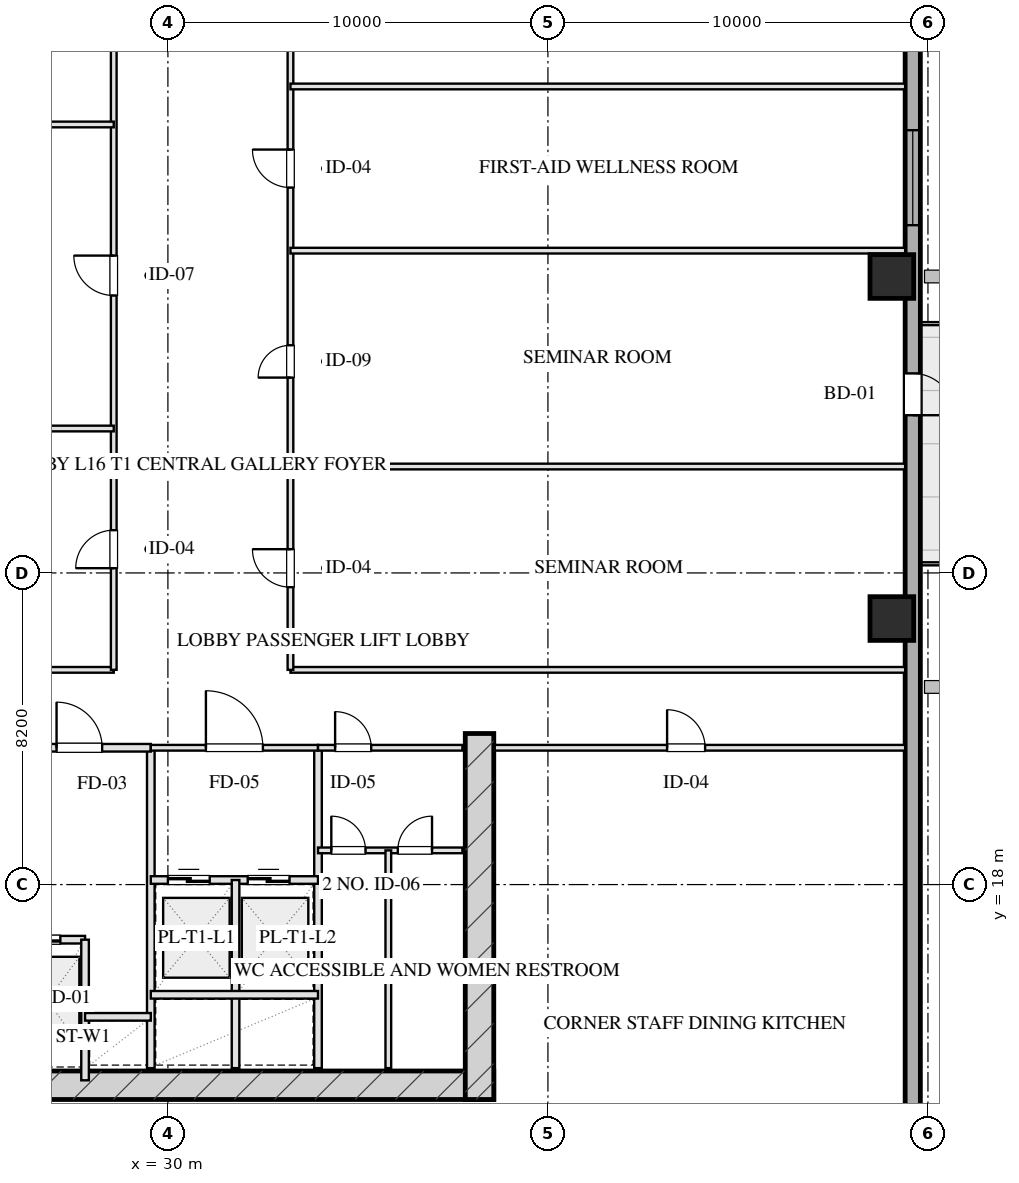
"""IFC4 building model, lengths in metres.
Left out: names, types, materials, properties, quantities, classifications, styles, units other than length and angle.
Written with IfcOpenShell. Run it as: python <this file> out.ifc"""

import sys

from ifc_helpers import new_model, si_unit, direction, frame, frame_2d, origin, origin_2d, place, context, subcontext, project, spatial, rectangle, hollow_rectangle, extrude, element, fill, save


model = new_model("IFC4")
c1 = context("Model", 3, precision=1e-05, world=origin(), true_north=direction((0.0, 1.0)))
c2 = subcontext(c1, "Body", "Model", "MODEL_VIEW")
j1 = project(units=[si_unit("LENGTHUNIT", "METRE"), si_unit("PLANEANGLEUNIT", "RADIAN")], contexts=[c1])
p1 = place(None, origin())
s1 = spatial("IfcSite", under=j1, at=p1, CompositionType="ELEMENT")
p2 = place(p1, origin())
s2 = spatial("IfcBuilding", under=s1, at=p2, CompositionType="ELEMENT")
p3 = place(p2, frame((0.0, 0.0, 67.85)))
s3 = spatial("IfcBuildingStorey", under=s2, at=p3, CompositionType="ELEMENT", Elevation=67.85)
p4 = place(p3, frame((21.425, 12.72, 0.0), z_axis=(0.0, 0.0, 1.0), x_axis=(1.0, 0.0, 0.0)))
e1 = element("IfcWall", 1, at=p4, inside=s3, PredefinedType="SHEAR", context=c2, shape_type="SweptSolid", body=[
    extrude(rectangle(XDim=17.15, YDim=0.75, at=frame_2d((8.575, 0.0))), origin(), (0.0, 0.0, 1.0), 3.45),
])
p5 = place(p3, frame((38.2, 21.975, 0.0), z_axis=(0.0, 0.0, 1.0), x_axis=(0.0, -1.0, 0.0)))
e2 = element("IfcWall", 2, at=p5, inside=s3, PredefinedType="SHEAR", context=c2, shape_type="SweptSolid", body=[
    extrude(rectangle(XDim=9.63, YDim=0.75, at=frame_2d((4.815, 0.0))), origin(), (0.0, 0.0, 1.0), 3.45),
])
for number, where, z_axis, x_axis in (
    (3, (49.05, 25.0, 0.0), (0.0, 0.0, 1.0), (1.0, 0.0, 0.0)),
    (4, (49.05, 34.0, 0.0), (0.0, 0.0, 1.0), (1.0, 0.0, 0.0)),
):
    element("IfcColumn", number, at=place(p3, frame(where, z_axis=z_axis, x_axis=x_axis)), inside=s3, PredefinedType="COLUMN", context=c2, shape_type="SweptSolid", body=[
        extrude(hollow_rectangle(XDim=1.15, YDim=1.15, WallThickness=0.04, at=origin_2d()), origin(), (0.0, 0.0, 1.0), 3.451),
    ])
p6 = place(p3, frame((49.6, 60.8, 0.0), z_axis=(0.0, 0.0, 1.0), x_axis=(0.0, -1.0, 0.0)))
e5 = element("IfcWall", 5, at=p6, inside=s3, PredefinedType="SOLIDWALL", context=c2, shape_type="SweptSolid", body=[
    extrude(rectangle(XDim=53.6, YDim=0.4, at=frame_2d((26.8, 0.0))), origin(), (0.0, 0.0, 1.0), 2.61),
])
p7 = place(p6, frame((22.95, 0.0, 0.75)))
e6 = element("IfcOpeningElement", 6, at=p7, cuts=e5, PredefinedType="OPENING", context=c2, shape_type="SweptSolid", body=[
    extrude(rectangle(XDim=2.5, YDim=1.46, at=frame_2d((1.25, 0.73))), frame((0.0, 0.21, 0.0), z_axis=(0.0, -1.0, 0.0), x_axis=(1.0, 0.0, 0.0)), (0.0, 0.0, 1.0), 0.42),
])
p8 = place(p6, frame((29.35, 0.0, 0.0)))
e7 = element("IfcOpeningElement", 7, at=p8, cuts=e5, PredefinedType="OPENING", context=c2, shape_type="SweptSolid", body=[
    extrude(rectangle(XDim=1.1, YDim=2.15, at=frame_2d((0.55, 1.075))), frame((0.0, 0.21, 0.0), z_axis=(0.0, -1.0, 0.0), x_axis=(1.0, 0.0, 0.0)), (0.0, 0.0, 1.0), 0.42),
])
p9 = place(p3, frame((29.55, 21.6, 0.0), z_axis=(0.0, 0.0, 1.0), x_axis=(0.0, -1.0, 0.0)))
e8 = element("IfcWall", 8, at=p9, inside=s3, PredefinedType="PARTITIONING", context=c2, shape_type="SweptSolid", body=[
    extrude(rectangle(XDim=8.43, YDim=0.2, at=frame_2d((4.215, 0.0))), origin(), (0.0, 0.0, 1.0), 3.175),
])
p10 = place(p3, frame((25.72, 21.6, 0.0), z_axis=(0.0, 0.0, 1.0), x_axis=(1.0, 0.0, 0.0)))
e9 = element("IfcWall", 9, at=p10, inside=s3, PredefinedType="PARTITIONING", context=c2, shape_type="SweptSolid", body=[
    extrude(rectangle(XDim=3.83, YDim=0.2, at=frame_2d((1.915, 0.0))), origin(), (0.0, 0.0, 1.0), 3.175),
])
p11 = place(p10, frame((1.35, 0.0, 0.0)))
e10 = element("IfcOpeningElement", 10, at=p11, cuts=e9, PredefinedType="OPENING", context=c2, shape_type="SweptSolid", body=[
    extrude(rectangle(XDim=1.2, YDim=2.05, at=frame_2d((0.6, 1.025))), frame((0.0, 0.11, 0.0), z_axis=(0.0, -1.0, 0.0), x_axis=(1.0, 0.0, 0.0)), (0.0, 0.0, 1.0), 0.22),
])
p12 = place(p3, frame((25.72, 16.55, 0.0), z_axis=(0.0, 0.0, 1.0), x_axis=(1.0, 0.0, 0.0)))
e11 = element("IfcWall", 11, at=p12, inside=s3, PredefinedType="PARTITIONING", context=c2, shape_type="SweptSolid", body=[
    extrude(rectangle(XDim=2.1, YDim=0.2, at=frame_2d((1.05, 0.0))), origin(), (0.0, 0.0, 1.0), 3.175),
])
p13 = place(p12, frame((0.35, 0.0, 0.0)))
e12 = element("IfcOpeningElement", 12, at=p13, cuts=e11, PredefinedType="OPENING", context=c2, shape_type="SweptSolid", body=[
    extrude(rectangle(XDim=1.1, YDim=2.05, at=frame_2d((0.55, 1.025))), frame((0.0, 0.11, 0.0), z_axis=(0.0, -1.0, 0.0), x_axis=(1.0, 0.0, 0.0)), (0.0, 0.0, 1.0), 0.22),
])
p14 = place(p3, frame((27.82, 16.55, 0.0), z_axis=(0.0, 0.0, 1.0), x_axis=(0.0, -1.0, 0.0)))
e13 = element("IfcWall", 13, at=p14, inside=s3, PredefinedType="PARTITIONING", context=c2, shape_type="SweptSolid", body=[
    extrude(rectangle(XDim=3.7, YDim=0.2, at=frame_2d((1.85, 0.0))), origin(), (0.0, 0.0, 1.0), 3.175),
])
p15 = place(p3, frame((27.82, 14.52, 0.0), z_axis=(0.0, 0.0, 1.0), x_axis=(1.0, 0.0, 0.0)))
e14 = element("IfcWall", 14, at=p15, inside=s3, PredefinedType="PARTITIONING", context=c2, shape_type="SweptSolid", body=[
    extrude(rectangle(XDim=1.73, YDim=0.2, at=frame_2d((0.865, 0.0))), origin(), (0.0, 0.0, 1.0), 3.175),
])
p16 = place(p3, frame((33.95, 21.6, 0.0), z_axis=(0.0, 0.0, 1.0), x_axis=(0.0, -1.0, 0.0)))
e15 = element("IfcWall", 15, at=p16, inside=s3, PredefinedType="PARTITIONING", context=c2, shape_type="SweptSolid", body=[
    extrude(rectangle(XDim=8.43, YDim=0.2, at=frame_2d((4.215, 0.0))), origin(), (0.0, 0.0, 1.0), 3.175),
])
p17 = place(p3, frame((29.55, 21.6, 0.0), z_axis=(0.0, 0.0, 1.0), x_axis=(1.0, 0.0, 0.0)))
e16 = element("IfcWall", 16, at=p17, inside=s3, PredefinedType="PARTITIONING", context=c2, shape_type="SweptSolid", body=[
    extrude(rectangle(XDim=4.4, YDim=0.15, at=frame_2d((2.2, 0.0))), origin(), (0.0, 0.0, 1.0), 3.175),
])
p18 = place(p17, frame((1.45, 0.0, 0.0)))
e17 = element("IfcOpeningElement", 17, at=p18, cuts=e16, PredefinedType="OPENING", context=c2, shape_type="SweptSolid", body=[
    extrude(rectangle(XDim=1.5, YDim=2.05, at=frame_2d((0.75, 1.025))), frame((0.0, 0.085, 0.0), z_axis=(0.0, -1.0, 0.0), x_axis=(1.0, 0.0, 0.0)), (0.0, 0.0, 1.0), 0.17),
])
p19 = place(p3, frame((29.55, 18.12, 0.0), z_axis=(0.0, 0.0, 1.0), x_axis=(1.0, 0.0, 0.0)))
e18 = element("IfcWall", 18, at=p19, inside=s3, PredefinedType="PARTITIONING", context=c2, shape_type="SweptSolid", body=[
    extrude(rectangle(XDim=4.4, YDim=0.2, at=frame_2d((2.2, 0.0))), origin(), (0.0, 0.0, 1.0), 3.175),
])
p20 = place(p19, frame((0.45, 0.0, 0.0)))
e19 = element("IfcOpeningElement", 19, at=p20, cuts=e18, PredefinedType="OPENING", context=c2, shape_type="SweptSolid", body=[
    extrude(rectangle(XDim=1.1, YDim=2.05, at=frame_2d((0.55, 1.025))), frame((0.0, 0.11, 0.0), z_axis=(0.0, -1.0, 0.0), x_axis=(1.0, 0.0, 0.0)), (0.0, 0.0, 1.0), 0.22),
])
p21 = place(p19, frame((2.55, 0.0, 0.0)))
e20 = element("IfcOpeningElement", 20, at=p21, cuts=e18, PredefinedType="OPENING", context=c2, shape_type="SweptSolid", body=[
    extrude(rectangle(XDim=1.1, YDim=2.05, at=frame_2d((0.55, 1.025))), frame((0.0, 0.11, 0.0), z_axis=(0.0, -1.0, 0.0), x_axis=(1.0, 0.0, 0.0)), (0.0, 0.0, 1.0), 0.22),
])
p22 = place(p3, frame((31.78, 18.12, 0.0), z_axis=(0.0, 0.0, 1.0), x_axis=(0.0, -1.0, 0.0)))
e21 = element("IfcWall", 21, at=p22, inside=s3, PredefinedType="PARTITIONING", context=c2, shape_type="SweptSolid", body=[
    extrude(rectangle(XDim=4.95, YDim=0.2, at=frame_2d((2.475, 0.0))), origin(), (0.0, 0.0, 1.0), 3.175),
])
p23 = place(p3, frame((29.55, 15.1, 0.0), z_axis=(0.0, 0.0, 1.0), x_axis=(1.0, 0.0, 0.0)))
e22 = element("IfcWall", 22, at=p23, inside=s3, PredefinedType="PARTITIONING", context=c2, shape_type="SweptSolid", body=[
    extrude(rectangle(XDim=4.4, YDim=0.2, at=frame_2d((2.2, 0.0))), origin(), (0.0, 0.0, 1.0), 3.175),
])
p24 = place(p3, frame((33.95, 21.6, 0.0), z_axis=(0.0, 0.0, 1.0), x_axis=(1.0, 0.0, 0.0)))
e23 = element("IfcWall", 23, at=p24, inside=s3, PredefinedType="PARTITIONING", context=c2, shape_type="SweptSolid", body=[
    extrude(rectangle(XDim=3.8, YDim=0.15, at=frame_2d((1.9, 0.0))), origin(), (0.0, 0.0, 1.0), 3.175),
])
p25 = place(p24, frame((0.45, 0.0, 0.0)))
e24 = element("IfcOpeningElement", 24, at=p25, cuts=e23, PredefinedType="OPENING", context=c2, shape_type="SweptSolid", body=[
    extrude(rectangle(XDim=0.95, YDim=2.05, at=frame_2d((0.475, 1.025))), frame((0.0, 0.085, 0.0), z_axis=(0.0, -1.0, 0.0), x_axis=(1.0, 0.0, 0.0)), (0.0, 0.0, 1.0), 0.17),
])
p26 = place(p3, frame((33.95, 18.9, 0.0), z_axis=(0.0, 0.0, 1.0), x_axis=(1.0, 0.0, 0.0)))
e25 = element("IfcWall", 25, at=p26, inside=s3, PredefinedType="PARTITIONING", context=c2, shape_type="SweptSolid", body=[
    extrude(rectangle(XDim=3.8, YDim=0.15, at=frame_2d((1.9, 0.0))), origin(), (0.0, 0.0, 1.0), 3.175),
])
p27 = place(p26, frame((0.35, 0.0, 0.0)))
e26 = element("IfcOpeningElement", 26, at=p27, cuts=e25, PredefinedType="OPENING", context=c2, shape_type="SweptSolid", body=[
    extrude(rectangle(XDim=0.9, YDim=2.05, at=frame_2d((0.45, 1.025))), frame((0.0, 0.085, 0.0), z_axis=(0.0, -1.0, 0.0), x_axis=(1.0, 0.0, 0.0)), (0.0, 0.0, 1.0), 0.17),
])
p28 = place(p26, frame((2.1, 0.0, 0.0)))
e27 = element("IfcOpeningElement", 27, at=p28, cuts=e25, PredefinedType="OPENING", context=c2, shape_type="SweptSolid", body=[
    extrude(rectangle(XDim=0.9, YDim=2.05, at=frame_2d((0.45, 1.025))), frame((0.0, 0.085, 0.0), z_axis=(0.0, -1.0, 0.0), x_axis=(1.0, 0.0, 0.0)), (0.0, 0.0, 1.0), 0.17),
])
p29 = place(p3, frame((35.8, 18.9, 0.0), z_axis=(0.0, 0.0, 1.0), x_axis=(0.0, -1.0, 0.0)))
e28 = element("IfcWall", 28, at=p29, inside=s3, PredefinedType="PARTITIONING", context=c2, shape_type="SweptSolid", body=[
    extrude(rectangle(XDim=5.73, YDim=0.15, at=frame_2d((2.865, 0.0))), origin(), (0.0, 0.0, 1.0), 3.175),
])
p30 = place(p3, frame((38.6, 21.6, 0.0), z_axis=(0.0, 0.0, 1.0), x_axis=(1.0, 0.0, 0.0)))
e29 = element("IfcWall", 29, at=p30, inside=s3, PredefinedType="PARTITIONING", context=c2, shape_type="SweptSolid", body=[
    extrude(rectangle(XDim=10.8, YDim=0.15, at=frame_2d((5.4, 0.0))), origin(), (0.0, 0.0, 1.0), 3.175),
])
p31 = place(p30, frame((4.536, 0.0, 0.0)))
e30 = element("IfcOpeningElement", 30, at=p31, cuts=e29, PredefinedType="OPENING", context=c2, shape_type="SweptSolid", body=[
    extrude(rectangle(XDim=1.0, YDim=2.05, at=frame_2d((0.5, 1.025))), frame((0.0, 0.085, 0.0), z_axis=(0.0, -1.0, 0.0), x_axis=(1.0, 0.0, 0.0)), (0.0, 0.0, 1.0), 0.17),
])
p32 = place(p3, frame((10.6, 23.65, 0.0), z_axis=(0.0, 0.0, 1.0), x_axis=(1.0, 0.0, 0.0)))
e31 = element("IfcWall", 31, at=p32, inside=s3, PredefinedType="PARTITIONING", context=c2, shape_type="SweptSolid", body=[
    extrude(rectangle(XDim=17.975, YDim=0.15, at=frame_2d((8.987, 0.0))), origin(), (0.0, 0.0, 1.0), 3.175),
])
p33 = place(p3, frame((33.225, 23.65, 0.0), z_axis=(0.0, 0.0, 1.0), x_axis=(1.0, 0.0, 0.0)))
e32 = element("IfcWall", 32, at=p33, inside=s3, PredefinedType="PARTITIONING", context=c2, shape_type="SweptSolid", body=[
    extrude(rectangle(XDim=16.175, YDim=0.15, at=frame_2d((8.087, 0.0))), origin(), (0.0, 0.0, 1.0), 3.175),
])
p34 = place(p3, frame((28.575, 23.65, 0.0), z_axis=(0.0, 0.0, 1.0), x_axis=(0.0, 1.0, 0.0)))
e33 = element("IfcWall", 33, at=p34, inside=s3, PredefinedType="PARTITIONING", context=c2, shape_type="SweptSolid", body=[
    extrude(rectangle(XDim=20.7, YDim=0.15, at=frame_2d((10.35, 0.0))), origin(), (0.0, 0.0, 1.0), 3.175),
])
p35 = place(p34, frame((2.675, 0.0, 0.0)))
e34 = element("IfcOpeningElement", 34, at=p35, cuts=e33, PredefinedType="OPENING", context=c2, shape_type="SweptSolid", body=[
    extrude(rectangle(XDim=1.0, YDim=2.05, at=frame_2d((0.5, 1.025))), frame((0.0, 0.085, 0.0), z_axis=(0.0, -1.0, 0.0), x_axis=(1.0, 0.0, 0.0)), (0.0, 0.0, 1.0), 0.17),
])
p36 = place(p34, frame((9.85, 0.0, 0.0)))
e35 = element("IfcOpeningElement", 35, at=p36, cuts=e33, PredefinedType="OPENING", context=c2, shape_type="SweptSolid", body=[
    extrude(rectangle(XDim=1.05, YDim=2.05, at=frame_2d((0.525, 1.025))), frame((0.0, 0.085, 0.0), z_axis=(0.0, -1.0, 0.0), x_axis=(1.0, 0.0, 0.0)), (0.0, 0.0, 1.0), 0.17),
])
p37 = place(p34, frame((17.025, 0.0, 0.0)))
e36 = element("IfcOpeningElement", 36, at=p37, cuts=e33, PredefinedType="OPENING", context=c2, shape_type="SweptSolid", body=[
    extrude(rectangle(XDim=1.0, YDim=2.05, at=frame_2d((0.5, 1.025))), frame((0.0, 0.085, 0.0), z_axis=(0.0, -1.0, 0.0), x_axis=(1.0, 0.0, 0.0)), (0.0, 0.0, 1.0), 0.17),
])
p38 = place(p3, frame((33.225, 23.65, 0.0), z_axis=(0.0, 0.0, 1.0), x_axis=(0.0, 1.0, 0.0)))
e37 = element("IfcWall", 37, at=p38, inside=s3, PredefinedType="PARTITIONING", context=c2, shape_type="SweptSolid", body=[
    extrude(rectangle(XDim=20.7, YDim=0.15, at=frame_2d((10.35, 0.0))), origin(), (0.0, 0.0, 1.0), 3.175),
])
p39 = place(p38, frame((2.175, 0.0, 0.0)))
e38 = element("IfcOpeningElement", 38, at=p39, cuts=e37, PredefinedType="OPENING", context=c2, shape_type="SweptSolid", body=[
    extrude(rectangle(XDim=1.0, YDim=2.05, at=frame_2d((0.5, 1.025))), frame((0.0, 0.085, 0.0), z_axis=(0.0, -1.0, 0.0), x_axis=(1.0, 0.0, 0.0)), (0.0, 0.0, 1.0), 0.17),
])
p40 = place(p38, frame((7.69, 0.0, 0.0)))
e39 = element("IfcOpeningElement", 39, at=p40, cuts=e37, PredefinedType="OPENING", context=c2, shape_type="SweptSolid", body=[
    extrude(rectangle(XDim=0.85, YDim=2.05, at=frame_2d((0.425, 1.025))), frame((0.0, 0.085, 0.0), z_axis=(0.0, -1.0, 0.0), x_axis=(1.0, 0.0, 0.0)), (0.0, 0.0, 1.0), 0.17),
])
p41 = place(p38, frame((12.69, 0.0, 0.0)))
e40 = element("IfcOpeningElement", 40, at=p41, cuts=e37, PredefinedType="OPENING", context=c2, shape_type="SweptSolid", body=[
    extrude(rectangle(XDim=1.0, YDim=2.05, at=frame_2d((0.5, 1.025))), frame((0.0, 0.085, 0.0), z_axis=(0.0, -1.0, 0.0), x_axis=(1.0, 0.0, 0.0)), (0.0, 0.0, 1.0), 0.17),
])
p42 = place(p38, frame((17.525, 0.0, 0.0)))
e41 = element("IfcOpeningElement", 41, at=p42, cuts=e37, PredefinedType="OPENING", context=c2, shape_type="SweptSolid", body=[
    extrude(rectangle(XDim=1.0, YDim=2.05, at=frame_2d((0.5, 1.025))), frame((0.0, 0.085, 0.0), z_axis=(0.0, -1.0, 0.0), x_axis=(1.0, 0.0, 0.0)), (0.0, 0.0, 1.0), 0.17),
])
for number, where, z_axis, x_axis in (
    (42, (10.6, 30.0, 0.0), (0.0, 0.0, 1.0), (1.0, 0.0, 0.0)),
    (43, (10.6, 38.0, 0.0), (0.0, 0.0, 1.0), (1.0, 0.0, 0.0)),
):
    element("IfcWall", number, at=place(p3, frame(where, z_axis=z_axis, x_axis=x_axis)), inside=s3, PredefinedType="PARTITIONING", context=c2, shape_type="SweptSolid", body=[
        extrude(rectangle(XDim=17.975, YDim=0.15, at=frame_2d((8.987, 0.0))), origin(), (0.0, 0.0, 1.0), 3.175),
    ])
for number, where, z_axis, x_axis in (
    (44, (33.225, 29.0, 0.0), (0.0, 0.0, 1.0), (1.0, 0.0, 0.0)),
    (45, (33.225, 34.68, 0.0), (0.0, 0.0, 1.0), (1.0, 0.0, 0.0)),
    (46, (33.225, 39.0, 0.0), (0.0, 0.0, 1.0), (1.0, 0.0, 0.0)),
):
    element("IfcWall", number, at=place(p3, frame(where, z_axis=z_axis, x_axis=x_axis)), inside=s3, PredefinedType="PARTITIONING", context=c2, shape_type="SweptSolid", body=[
        extrude(rectangle(XDim=16.175, YDim=0.15, at=frame_2d((8.087, 0.0))), origin(), (0.0, 0.0, 1.0), 3.175),
    ])
p43 = place(p7, origin())
e47 = element("IfcWindow", 47, at=p43, inside=s3, PartitioningType="TRIPLE_PANEL_VERTICAL", PredefinedType="WINDOW", context=c2, shape_type="SweptSolid", body=[
    extrude(rectangle(XDim=2.5, YDim=1.46, at=frame_2d((1.25, 0.73))), frame((0.0, 0.03, 0.0), z_axis=(0.0, -1.0, 0.0), x_axis=(1.0, 0.0, 0.0)), (0.0, 0.0, 1.0), 0.06),
])
fill(e6, e47)
p44 = place(p8, origin())
e48 = element("IfcDoor", 48, at=p44, inside=s3, OperationType="SINGLE_SWING_RIGHT", PredefinedType="DOOR", context=c2, shape_type="SweptSolid", body=[
    extrude(rectangle(XDim=1.1, YDim=2.15, at=frame_2d((0.55, 1.075))), frame((0.0, 0.025, 0.0), z_axis=(0.0, -1.0, 0.0), x_axis=(1.0, 0.0, 0.0)), (0.0, 0.0, 1.0), 0.05),
])
fill(e7, e48)
p45 = place(p11, origin())
e49 = element("IfcDoor", 49, at=p45, inside=s3, OperationType="SINGLE_SWING_LEFT", PredefinedType="DOOR", context=c2, shape_type="SweptSolid", body=[
    extrude(rectangle(XDim=1.2, YDim=2.05, at=frame_2d((0.6, 1.025))), frame((0.0, 0.025, 0.0), z_axis=(0.0, -1.0, 0.0), x_axis=(1.0, 0.0, 0.0)), (0.0, 0.0, 1.0), 0.05),
])
fill(e10, e49)
p46 = place(p13, origin())
e50 = element("IfcDoor", 50, at=p46, inside=s3, OperationType="DOUBLE_DOOR_SLIDING", PredefinedType="DOOR", context=c2, shape_type="SweptSolid", body=[
    extrude(rectangle(XDim=1.1, YDim=2.05, at=frame_2d((0.55, 1.025))), frame((0.0, 0.025, 0.0), z_axis=(0.0, -1.0, 0.0), x_axis=(1.0, 0.0, 0.0)), (0.0, 0.0, 1.0), 0.05),
])
fill(e12, e50)
p47 = place(p18, origin())
e51 = element("IfcDoor", 51, at=p47, inside=s3, OperationType="SINGLE_SWING_LEFT", PredefinedType="DOOR", context=c2, shape_type="SweptSolid", body=[
    extrude(rectangle(XDim=1.5, YDim=2.05, at=frame_2d((0.75, 1.025))), frame((0.0, 0.025, 0.0), z_axis=(0.0, -1.0, 0.0), x_axis=(1.0, 0.0, 0.0)), (0.0, 0.0, 1.0), 0.05),
])
fill(e17, e51)
p48 = place(p20, origin())
e52 = element("IfcDoor", 52, at=p48, inside=s3, OperationType="DOUBLE_DOOR_SLIDING", PredefinedType="DOOR", context=c2, shape_type="SweptSolid", body=[
    extrude(rectangle(XDim=1.1, YDim=2.05, at=frame_2d((0.55, 1.025))), frame((0.0, 0.025, 0.0), z_axis=(0.0, -1.0, 0.0), x_axis=(1.0, 0.0, 0.0)), (0.0, 0.0, 1.0), 0.05),
])
fill(e19, e52)
p49 = place(p21, origin())
e53 = element("IfcDoor", 53, at=p49, inside=s3, OperationType="DOUBLE_DOOR_SLIDING", PredefinedType="DOOR", context=c2, shape_type="SweptSolid", body=[
    extrude(rectangle(XDim=1.1, YDim=2.05, at=frame_2d((0.55, 1.025))), frame((0.0, 0.025, 0.0), z_axis=(0.0, -1.0, 0.0), x_axis=(1.0, 0.0, 0.0)), (0.0, 0.0, 1.0), 0.05),
])
fill(e20, e53)
p50 = place(p25, origin())
e54 = element("IfcDoor", 54, at=p50, inside=s3, OperationType="SINGLE_SWING_LEFT", PredefinedType="DOOR", context=c2, shape_type="SweptSolid", body=[
    extrude(rectangle(XDim=0.95, YDim=2.05, at=frame_2d((0.475, 1.025))), frame((0.0, 0.025, 0.0), z_axis=(0.0, -1.0, 0.0), x_axis=(1.0, 0.0, 0.0)), (0.0, 0.0, 1.0), 0.05),
])
fill(e24, e54)
p51 = place(p27, origin())
e55 = element("IfcDoor", 55, at=p51, inside=s3, OperationType="SINGLE_SWING_LEFT", PredefinedType="DOOR", context=c2, shape_type="SweptSolid", body=[
    extrude(rectangle(XDim=0.9, YDim=2.05, at=frame_2d((0.45, 1.025))), frame((0.0, 0.025, 0.0), z_axis=(0.0, -1.0, 0.0), x_axis=(1.0, 0.0, 0.0)), (0.0, 0.0, 1.0), 0.05),
])
fill(e26, e55)
p52 = place(p28, origin())
e56 = element("IfcDoor", 56, at=p52, inside=s3, OperationType="SINGLE_SWING_RIGHT", PredefinedType="DOOR", context=c2, shape_type="SweptSolid", body=[
    extrude(rectangle(XDim=0.9, YDim=2.05, at=frame_2d((0.45, 1.025))), frame((0.0, 0.025, 0.0), z_axis=(0.0, -1.0, 0.0), x_axis=(1.0, 0.0, 0.0)), (0.0, 0.0, 1.0), 0.05),
])
fill(e27, e56)
p53 = place(p31, origin())
e57 = element("IfcDoor", 57, at=p53, inside=s3, OperationType="SINGLE_SWING_LEFT", PredefinedType="DOOR", context=c2, shape_type="SweptSolid", body=[
    extrude(rectangle(XDim=1.0, YDim=2.05, at=frame_2d((0.5, 1.025))), frame((0.0, 0.025, 0.0), z_axis=(0.0, -1.0, 0.0), x_axis=(1.0, 0.0, 0.0)), (0.0, 0.0, 1.0), 0.05),
])
fill(e30, e57)
p54 = place(p35, origin())
e58 = element("IfcDoor", 58, at=p54, inside=s3, OperationType="SINGLE_SWING_LEFT", PredefinedType="DOOR", context=c2, shape_type="SweptSolid", body=[
    extrude(rectangle(XDim=1.0, YDim=2.05, at=frame_2d((0.5, 1.025))), frame((0.0, 0.025, 0.0), z_axis=(0.0, -1.0, 0.0), x_axis=(1.0, 0.0, 0.0)), (0.0, 0.0, 1.0), 0.05),
])
fill(e34, e58)
p55 = place(p36, origin())
e59 = element("IfcDoor", 59, at=p55, inside=s3, OperationType="SINGLE_SWING_RIGHT", PredefinedType="DOOR", context=c2, shape_type="SweptSolid", body=[
    extrude(rectangle(XDim=1.05, YDim=2.05, at=frame_2d((0.525, 1.025))), frame((0.0, 0.025, 0.0), z_axis=(0.0, -1.0, 0.0), x_axis=(1.0, 0.0, 0.0)), (0.0, 0.0, 1.0), 0.05),
])
fill(e35, e59)
p56 = place(p39, origin())
e60 = element("IfcDoor", 60, at=p56, inside=s3, OperationType="SINGLE_SWING_RIGHT", PredefinedType="DOOR", context=c2, shape_type="SweptSolid", body=[
    extrude(rectangle(XDim=1.0, YDim=2.05, at=frame_2d((0.5, 1.025))), frame((0.0, 0.025, 0.0), z_axis=(0.0, -1.0, 0.0), x_axis=(1.0, 0.0, 0.0)), (0.0, 0.0, 1.0), 0.05),
])
fill(e38, e60)
p57 = place(p40, origin())
e61 = element("IfcDoor", 61, at=p57, inside=s3, OperationType="SINGLE_SWING_LEFT", PredefinedType="DOOR", context=c2, shape_type="SweptSolid", body=[
    extrude(rectangle(XDim=0.85, YDim=2.05, at=frame_2d((0.425, 1.025))), frame((0.0, 0.025, 0.0), z_axis=(0.0, -1.0, 0.0), x_axis=(1.0, 0.0, 0.0)), (0.0, 0.0, 1.0), 0.05),
])
fill(e39, e61)
p58 = place(p41, origin())
e62 = element("IfcDoor", 62, at=p58, inside=s3, OperationType="SINGLE_SWING_RIGHT", PredefinedType="DOOR", context=c2, shape_type="SweptSolid", body=[
    extrude(rectangle(XDim=1.0, YDim=2.05, at=frame_2d((0.5, 1.025))), frame((0.0, 0.025, 0.0), z_axis=(0.0, -1.0, 0.0), x_axis=(1.0, 0.0, 0.0)), (0.0, 0.0, 1.0), 0.05),
])
fill(e40, e62)
save(model, sys.argv[1])
